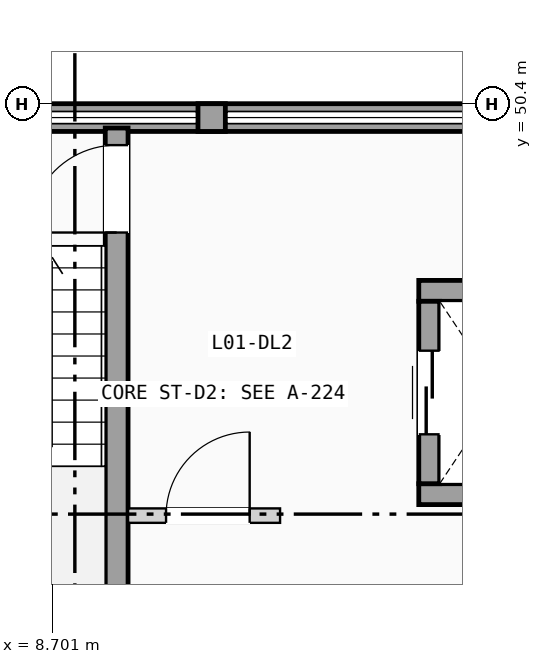
"""IFC4 building model, lengths in metres.
Left out: names, types, materials, properties, quantities, classifications, styles, units other than length and angle.
Written with IfcOpenShell. Run it as: python <this file> out.ifc"""

import sys

from ifc_helpers import new_model, si_unit, direction, frame, frame_2d, origin, place, context, subcontext, project, spatial, rectangle, extrude, element, fill, save


model = new_model("IFC4")
c1 = context("Model", 3, precision=1e-05, world=origin(), true_north=direction((0.0, 1.0)))
c2 = subcontext(c1, "Body", "Model", "MODEL_VIEW")
j1 = project(units=[si_unit("LENGTHUNIT", "METRE"), si_unit("PLANEANGLEUNIT", "RADIAN")], contexts=[c1])
p1 = place(None, origin())
s1 = spatial("IfcSite", under=j1, at=p1, CompositionType="ELEMENT")
p2 = place(p1, origin())
s2 = spatial("IfcBuilding", under=s1, at=p2, CompositionType="ELEMENT")
p3 = place(p2, frame((0.0, 0.0, 4.9)))
s3 = spatial("IfcBuildingStorey", under=s2, at=p3, CompositionType="ELEMENT", Elevation=4.9)
p4 = place(p3, frame((0.0, 50.218, 0.0), z_axis=(0.0, 0.0, 1.0), x_axis=(1.0, 0.0, 0.0)))
e1 = element("IfcWall", 1, at=p4, inside=s3, PredefinedType="SOLIDWALL", context=c2, shape_type="SweptSolid", body=[
    extrude(rectangle(XDim=21.6, YDim=0.365, at=frame_2d((10.8, 0.0))), origin(), (0.0, 0.0, 1.0), 1.11),
])
p5 = place(p3, frame((10.62, 50.218, 1.11), z_axis=(0.0, 0.0, 1.0), x_axis=(1.0, 0.0, 0.0)))
e2 = element("IfcWall", 2, at=p5, inside=s3, PredefinedType="SOLIDWALL", context=c2, shape_type="SweptSolid", body=[
    extrude(rectangle(XDim=0.36, YDim=0.365, at=frame_2d((0.18, 0.0))), origin(), (0.0, 0.0, 1.0), 2.305),
])
p6 = place(p3, frame((9.55, 43.08, 0.0), z_axis=(0.0, 0.0, 1.0), x_axis=(0.0, 1.0, 0.0)))
e3 = element("IfcWall", 3, at=p6, inside=s3, PredefinedType="SHEAR", context=c2, shape_type="SweptSolid", body=[
    extrude(rectangle(XDim=7.0, YDim=0.3, at=frame_2d((3.5, 0.0))), origin(), (0.0, 0.0, 1.0), 3.415),
])
p7 = place(p6, frame((5.625, 0.0, 0.0)))
e4 = element("IfcOpeningElement", 4, at=p7, cuts=e3, PredefinedType="OPENING", context=c2, shape_type="SweptSolid", body=[
    extrude(rectangle(XDim=1.15, YDim=2.12, at=frame_2d((0.575, 1.06))), frame((0.0, 0.16, 0.0), z_axis=(0.0, -1.0, 0.0), x_axis=(1.0, 0.0, 0.0)), (0.0, 0.0, 1.0), 0.32),
])
for number, where, z_axis, x_axis in (
    (5, (13.525, 45.262, 0.0), (0.0, 0.0, 1.0), (1.0, 0.0, 0.0)),
    (6, (13.525, 47.938, 0.0), (0.0, 0.0, 1.0), (1.0, 0.0, 0.0)),
):
    element("IfcWall", number, at=place(p3, frame(where, z_axis=z_axis, x_axis=x_axis)), inside=s3, PredefinedType="SHEAR", context=c2, shape_type="SweptSolid", body=[
        extrude(rectangle(XDim=2.15, YDim=0.275, at=frame_2d((1.075, 0.0))), origin(), (0.0, 0.0, 1.0), 3.415),
    ])
p8 = place(p3, frame((13.663, 45.4, 0.0), z_axis=(0.0, 0.0, 1.0), x_axis=(0.0, 1.0, 0.0)))
e7 = element("IfcWall", 7, at=p8, inside=s3, PredefinedType="SHEAR", context=c2, shape_type="SweptSolid", body=[
    extrude(rectangle(XDim=2.4, YDim=0.275, at=frame_2d((1.2, 0.0))), origin(), (0.0, 0.0, 1.0), 3.415),
])
p9 = place(p8, frame((0.65, 0.0, 0.0)))
e8 = element("IfcOpeningElement", 8, at=p9, cuts=e7, PredefinedType="OPENING", context=c2, shape_type="SweptSolid", body=[
    extrude(rectangle(XDim=1.1, YDim=2.15, at=frame_2d((0.55, 1.075))), frame((0.0, 0.147, 0.0), z_axis=(0.0, -1.0, 0.0), x_axis=(1.0, 0.0, 0.0)), (0.0, 0.0, 1.0), 0.295),
])
p10 = place(p3, frame((9.7, 44.98, 0.0), z_axis=(0.0, 0.0, 1.0), x_axis=(1.0, 0.0, 0.0)))
e9 = element("IfcWall", 9, at=p10, inside=s3, PredefinedType="PARTITIONING", context=c2, shape_type="SweptSolid", body=[
    extrude(rectangle(XDim=2.0, YDim=0.19, at=frame_2d((1.0, 0.0))), origin(), (0.0, 0.0, 1.0), 3.395),
])
p11 = place(p10, frame((0.5, 0.0, 0.0)))
e10 = element("IfcOpeningElement", 10, at=p11, cuts=e9, PredefinedType="OPENING", context=c2, shape_type="SweptSolid", body=[
    extrude(rectangle(XDim=1.1, YDim=2.12, at=frame_2d((0.55, 1.06))), frame((0.0, 0.105, 0.0), z_axis=(0.0, -1.0, 0.0), x_axis=(1.0, 0.0, 0.0)), (0.0, 0.0, 1.0), 0.21),
])
p12 = place(p7, origin())
e11 = element("IfcDoor", 11, at=p12, inside=s3, OperationType="SINGLE_SWING_LEFT", PredefinedType="DOOR", context=c2, shape_type="SweptSolid", body=[
    extrude(rectangle(XDim=1.15, YDim=2.12, at=frame_2d((0.575, 1.06))), frame((0.0, 0.025, 0.0), z_axis=(0.0, -1.0, 0.0), x_axis=(1.0, 0.0, 0.0)), (0.0, 0.0, 1.0), 0.05),
])
fill(e4, e11)
p13 = place(p9, origin())
e12 = element("IfcDoor", 12, at=p13, inside=s3, OperationType="SLIDING_TO_LEFT", PredefinedType="DOOR", context=c2, shape_type="SweptSolid", body=[
    extrude(rectangle(XDim=1.1, YDim=2.15, at=frame_2d((0.55, 1.075))), frame((0.0, 0.025, 0.0), z_axis=(0.0, -1.0, 0.0), x_axis=(1.0, 0.0, 0.0)), (0.0, 0.0, 1.0), 0.05),
])
fill(e8, e12)
p14 = place(p11, origin())
e13 = element("IfcDoor", 13, at=p14, inside=s3, OperationType="SINGLE_SWING_RIGHT", PredefinedType="DOOR", context=c2, shape_type="SweptSolid", body=[
    extrude(rectangle(XDim=1.1, YDim=2.12, at=frame_2d((0.55, 1.06))), frame((0.0, 0.025, 0.0), z_axis=(0.0, -1.0, 0.0), x_axis=(1.0, 0.0, 0.0)), (0.0, 0.0, 1.0), 0.05),
])
fill(e10, e13)
save(model, sys.argv[1])
